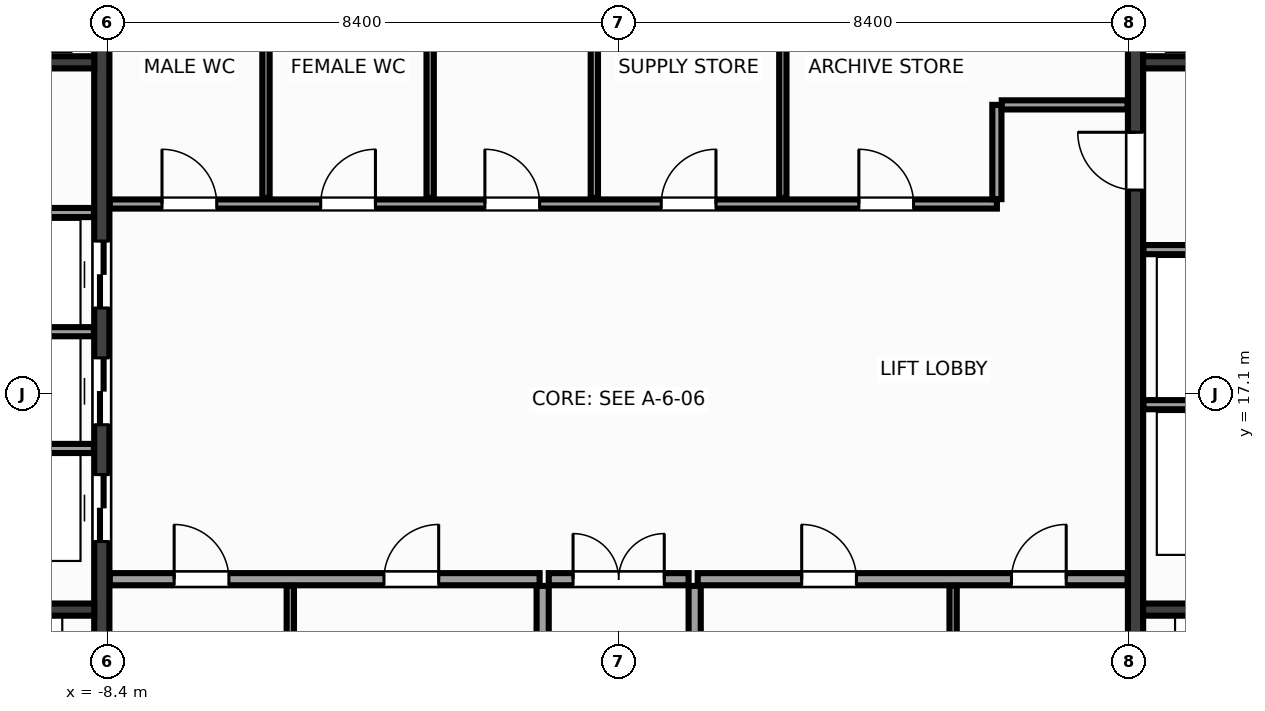
"""IFC4 building model, lengths in metres.
Left out: names, types, materials, properties, quantities, classifications, styles, units other than length and angle.
Written with IfcOpenShell. Run it as: python <this file> out.ifc"""

import sys

from ifc_helpers import new_model, si_unit, direction, frame, frame_2d, origin, place, context, subcontext, project, spatial, rectangle, extrude, source, transform, mapped, element, fill, save


model = new_model("IFC4")
c1 = context("Model", 3, precision=1e-05, world=origin(), true_north=direction((0.0, 1.0)))
c2 = subcontext(c1, "Body", "Model", "MODEL_VIEW")
j1 = project(units=[si_unit("LENGTHUNIT", "METRE"), si_unit("PLANEANGLEUNIT", "RADIAN")], contexts=[c1])
p1 = place(None, origin())
s1 = spatial("IfcSite", under=j1, at=p1, CompositionType="ELEMENT")
p2 = place(p1, origin())
s2 = spatial("IfcBuilding", under=s1, at=p2, CompositionType="ELEMENT")
p3 = place(p2, frame((0.0, 0.0, 254.0)))
s3 = spatial("IfcBuildingStorey", under=s2, at=p3, CompositionType="ELEMENT", Elevation=254.0)
m1 = source(origin(), c2, "Body", "SweptSolid", [
    extrude(rectangle(XDim=13.1, YDim=0.25, at=frame_2d((6.55, 0.0))), origin(), (0.0, 0.0, 1.0), 3.6),
])
p4 = place(p3, frame((-8.5, 10.45, 0.0), z_axis=(0.0, 0.0, 1.0), x_axis=(0.0, 1.0, 0.0)))
e1 = element("IfcWall", 1, at=p4, inside=s3, PredefinedType="SHEAR", context=c2, shape_type="MappedRepresentation", body=[
    mapped(m1, transform((0.0, 0.0, 0.0), x_axis=(1.0, 0.0, 0.0), y_axis=(0.0, 1.0, 0.0), z_axis=(0.0, 0.0, 1.0), scale=1.0)),
])
p5 = place(p4, frame((4.22, 0.0, 0.0)))
e2 = element("IfcOpeningElement", 2, at=p5, cuts=e1, PredefinedType="OPENING", context=c2, shape_type="SweptSolid", body=[
    extrude(rectangle(XDim=1.1, YDim=2.15, at=frame_2d((0.55, 1.075))), frame((0.0, 0.137, 0.0), z_axis=(0.0, -1.0, 0.0), x_axis=(1.0, 0.0, 0.0)), (0.0, 0.0, 1.0), 0.274),
])
p6 = place(p4, frame((6.14, 0.0, 0.0)))
e3 = element("IfcOpeningElement", 3, at=p6, cuts=e1, PredefinedType="OPENING", context=c2, shape_type="SweptSolid", body=[
    extrude(rectangle(XDim=1.1, YDim=2.15, at=frame_2d((0.55, 1.075))), frame((0.0, 0.137, 0.0), z_axis=(0.0, -1.0, 0.0), x_axis=(1.0, 0.0, 0.0)), (0.0, 0.0, 1.0), 0.274),
])
p7 = place(p4, frame((8.06, 0.0, 0.0)))
e4 = element("IfcOpeningElement", 4, at=p7, cuts=e1, PredefinedType="OPENING", context=c2, shape_type="SweptSolid", body=[
    extrude(rectangle(XDim=1.1, YDim=2.15, at=frame_2d((0.55, 1.075))), frame((0.0, 0.137, 0.0), z_axis=(0.0, -1.0, 0.0), x_axis=(1.0, 0.0, 0.0)), (0.0, 0.0, 1.0), 0.274),
])
p8 = place(p3, frame((8.5, 10.45, 0.0), z_axis=(0.0, 0.0, 1.0), x_axis=(0.0, 1.0, 0.0)))
e5 = element("IfcWall", 5, at=p8, inside=s3, PredefinedType="SHEAR", context=c2, shape_type="MappedRepresentation", body=[
    mapped(m1, transform((0.0, 0.0, 0.0), x_axis=(1.0, 0.0, 0.0), y_axis=(0.0, 1.0, 0.0), z_axis=(0.0, 0.0, 1.0), scale=1.0)),
])
p9 = place(p8, frame((10.0, 0.0, 0.0)))
e6 = element("IfcOpeningElement", 6, at=p9, cuts=e5, PredefinedType="OPENING", context=c2, shape_type="SweptSolid", body=[
    extrude(rectangle(XDim=0.95, YDim=2.15, at=frame_2d((0.475, 1.075))), frame((0.0, 0.137, 0.0), z_axis=(0.0, -1.0, 0.0), x_axis=(1.0, 0.0, 0.0)), (0.0, 0.0, 1.0), 0.274),
])
m2 = source(origin(), c2, "Body", "SweptSolid", [
    extrude(rectangle(XDim=2.825, YDim=0.2, at=frame_2d((1.413, 0.0))), origin(), (0.0, 0.0, 1.0), 3.6),
])
for number, where, z_axis, x_axis in (
    (7, (-11.45, 13.55, 0.0), (0.0, 0.0, 1.0), (1.0, 0.0, 0.0)),
    (8, (8.625, 13.55, 0.0), (0.0, 0.0, 1.0), (1.0, 0.0, 0.0)),
):
    element("IfcWall", number, at=place(p3, frame(where, z_axis=z_axis, x_axis=x_axis)), inside=s3, PredefinedType="SHEAR", context=c2, shape_type="MappedRepresentation", body=[
        mapped(m2, transform((0.0, 0.0, 0.0), x_axis=(1.0, 0.0, 0.0), y_axis=(0.0, 1.0, 0.0), z_axis=(0.0, 0.0, 1.0), scale=1.0)),
    ])
m3 = source(origin(), c2, "Body", "SweptSolid", [
    extrude(rectangle(XDim=3.02, YDim=0.2, at=frame_2d((1.51, 0.0))), origin(), (0.0, 0.0, 1.0), 3.6),
])
for number, where, z_axis, x_axis in (
    (9, (-11.645, 22.55, 0.0), (0.0, 0.0, 1.0), (1.0, 0.0, 0.0)),
    (10, (8.625, 22.55, 0.0), (0.0, 0.0, 1.0), (1.0, 0.0, 0.0)),
):
    element("IfcWall", number, at=place(p3, frame(where, z_axis=z_axis, x_axis=x_axis)), inside=s3, PredefinedType="SHEAR", context=c2, shape_type="MappedRepresentation", body=[
        mapped(m3, transform((0.0, 0.0, 0.0), x_axis=(1.0, 0.0, 0.0), y_axis=(0.0, 1.0, 0.0), z_axis=(0.0, 0.0, 1.0), scale=1.0)),
    ])
m4 = source(origin(), c2, "Body", "SweptSolid", [
    extrude(rectangle(XDim=3.01, YDim=0.15, at=frame_2d((1.505, 0.0))), origin(), (0.0, 0.0, 1.0), 3.37),
])
for number, where, z_axis, x_axis in (
    (11, (-11.64, 16.2, 0.0), (0.0, 0.0, 1.0), (1.0, 0.0, 0.0)),
    (12, (-11.64, 18.12, 0.0), (0.0, 0.0, 1.0), (1.0, 0.0, 0.0)),
    (13, (-11.64, 20.08, 0.0), (0.0, 0.0, 1.0), (1.0, 0.0, 0.0)),
    (14, (8.63, 16.92, 0.0), (0.0, 0.0, 1.0), (1.0, 0.0, 0.0)),
    (15, (8.63, 19.47, 0.0), (0.0, 0.0, 1.0), (1.0, 0.0, 0.0)),
):
    element("IfcWall", number, at=place(p3, frame(where, z_axis=z_axis, x_axis=x_axis)), inside=s3, PredefinedType="PARTITIONING", context=c2, shape_type="MappedRepresentation", body=[
        mapped(m4, transform((0.0, 0.0, 0.0), x_axis=(1.0, 0.0, 0.0), y_axis=(0.0, 1.0, 0.0), z_axis=(0.0, 0.0, 1.0), scale=1.0)),
    ])
m5 = source(origin(), c2, "Body", "SweptSolid", [
    extrude(rectangle(XDim=7.07, YDim=0.2, at=frame_2d((3.535, 0.0))), origin(), (0.0, 0.0, 1.0), 3.37),
])
p10 = place(p3, frame((-8.37, 14.05, 0.0), z_axis=(0.0, 0.0, 1.0), x_axis=(1.0, 0.0, 0.0)))
e16 = element("IfcWall", 16, at=p10, inside=s3, PredefinedType="PARTITIONING", context=c2, shape_type="MappedRepresentation", body=[
    mapped(m5, transform((0.0, 0.0, 0.0), x_axis=(1.0, 0.0, 0.0), y_axis=(0.0, 1.0, 0.0), z_axis=(0.0, 0.0, 1.0), scale=1.0)),
])
p11 = place(p10, frame((1.06, 0.0, 0.0)))
e17 = element("IfcOpeningElement", 17, at=p11, cuts=e16, PredefinedType="OPENING", context=c2, shape_type="SweptSolid", body=[
    extrude(rectangle(XDim=0.9, YDim=2.15, at=frame_2d((0.45, 1.075))), frame((0.0, 0.112, 0.0), z_axis=(0.0, -1.0, 0.0), x_axis=(1.0, 0.0, 0.0)), (0.0, 0.0, 1.0), 0.224),
])
p12 = place(p10, frame((4.51, 0.0, 0.0)))
e18 = element("IfcOpeningElement", 18, at=p12, cuts=e16, PredefinedType="OPENING", context=c2, shape_type="SweptSolid", body=[
    extrude(rectangle(XDim=0.9, YDim=2.15, at=frame_2d((0.45, 1.075))), frame((0.0, 0.112, 0.0), z_axis=(0.0, -1.0, 0.0), x_axis=(1.0, 0.0, 0.0)), (0.0, 0.0, 1.0), 0.224),
])
p13 = place(p3, frame((1.3, 14.05, 0.0), z_axis=(0.0, 0.0, 1.0), x_axis=(1.0, 0.0, 0.0)))
e19 = element("IfcWall", 19, at=p13, inside=s3, PredefinedType="PARTITIONING", context=c2, shape_type="MappedRepresentation", body=[
    mapped(m5, transform((0.0, 0.0, 0.0), x_axis=(1.0, 0.0, 0.0), y_axis=(0.0, 1.0, 0.0), z_axis=(0.0, 0.0, 1.0), scale=1.0)),
])
p14 = place(p13, frame((1.71, 0.0, 0.0)))
e20 = element("IfcOpeningElement", 20, at=p14, cuts=e19, PredefinedType="OPENING", context=c2, shape_type="SweptSolid", body=[
    extrude(rectangle(XDim=0.9, YDim=2.15, at=frame_2d((0.45, 1.075))), frame((0.0, 0.112, 0.0), z_axis=(0.0, -1.0, 0.0), x_axis=(1.0, 0.0, 0.0)), (0.0, 0.0, 1.0), 0.224),
])
p15 = place(p13, frame((5.16, 0.0, 0.0)))
e21 = element("IfcOpeningElement", 21, at=p15, cuts=e19, PredefinedType="OPENING", context=c2, shape_type="SweptSolid", body=[
    extrude(rectangle(XDim=0.9, YDim=2.15, at=frame_2d((0.45, 1.075))), frame((0.0, 0.112, 0.0), z_axis=(0.0, -1.0, 0.0), x_axis=(1.0, 0.0, 0.0)), (0.0, 0.0, 1.0), 0.224),
])
m6 = source(origin(), c2, "Body", "SweptSolid", [
    extrude(rectangle(XDim=3.49, YDim=0.2, at=frame_2d((1.745, 0.0))), origin(), (0.0, 0.0, 1.0), 3.37),
])
for number, where, z_axis, x_axis in (
    (22, (-1.25, 10.45, 0.0), (0.0, 0.0, 1.0), (0.0, 1.0, 0.0)),
    (23, (1.25, 10.45, 0.0), (0.0, 0.0, 1.0), (0.0, 1.0, 0.0)),
):
    element("IfcWall", number, at=place(p3, frame(where, z_axis=z_axis, x_axis=x_axis)), inside=s3, PredefinedType="PARTITIONING", context=c2, shape_type="MappedRepresentation", body=[
        mapped(m6, transform((0.0, 0.0, 0.0), x_axis=(1.0, 0.0, 0.0), y_axis=(0.0, 1.0, 0.0), z_axis=(0.0, 0.0, 1.0), scale=1.0)),
    ])
m7 = source(origin(), c2, "Body", "SweptSolid", [
    extrude(rectangle(XDim=2.3, YDim=0.2, at=frame_2d((1.15, 0.0))), origin(), (0.0, 0.0, 1.0), 3.37),
])
p16 = place(p3, frame((-1.15, 14.05, 0.0), z_axis=(0.0, 0.0, 1.0), x_axis=(1.0, 0.0, 0.0)))
e24 = element("IfcWall", 24, at=p16, inside=s3, PredefinedType="PARTITIONING", context=c2, shape_type="MappedRepresentation", body=[
    mapped(m7, transform((0.0, 0.0, 0.0), x_axis=(1.0, 0.0, 0.0), y_axis=(0.0, 1.0, 0.0), z_axis=(0.0, 0.0, 1.0), scale=1.0)),
])
p17 = place(p16, frame((0.4, 0.0, 0.0)))
e25 = element("IfcOpeningElement", 25, at=p17, cuts=e24, PredefinedType="OPENING", context=c2, shape_type="SweptSolid", body=[
    extrude(rectangle(XDim=1.5, YDim=2.2, at=frame_2d((0.75, 1.1))), frame((0.0, 0.112, 0.0), z_axis=(0.0, -1.0, 0.0), x_axis=(1.0, 0.0, 0.0)), (0.0, 0.0, 1.0), 0.224),
])
m8 = source(origin(), c2, "Body", "SweptSolid", [
    extrude(rectangle(XDim=14.59, YDim=0.15, at=frame_2d((7.295, 0.0))), origin(), (0.0, 0.0, 1.0), 3.37),
])
p18 = place(p3, frame((-8.37, 20.22, 0.0), z_axis=(0.0, 0.0, 1.0), x_axis=(1.0, 0.0, 0.0)))
e26 = element("IfcWall", 26, at=p18, inside=s3, PredefinedType="PARTITIONING", context=c2, shape_type="MappedRepresentation", body=[
    mapped(m8, transform((0.0, 0.0, 0.0), x_axis=(1.0, 0.0, 0.0), y_axis=(0.0, 1.0, 0.0), z_axis=(0.0, 0.0, 1.0), scale=1.0)),
])
p19 = place(p18, frame((0.86, 0.0, 0.0)))
e27 = element("IfcOpeningElement", 27, at=p19, cuts=e26, PredefinedType="OPENING", context=c2, shape_type="SweptSolid", body=[
    extrude(rectangle(XDim=0.9, YDim=2.15, at=frame_2d((0.45, 1.075))), frame((0.0, 0.087, 0.0), z_axis=(0.0, -1.0, 0.0), x_axis=(1.0, 0.0, 0.0)), (0.0, 0.0, 1.0), 0.174),
])
p20 = place(p18, frame((3.47, 0.0, 0.0)))
e28 = element("IfcOpeningElement", 28, at=p20, cuts=e26, PredefinedType="OPENING", context=c2, shape_type="SweptSolid", body=[
    extrude(rectangle(XDim=0.9, YDim=2.15, at=frame_2d((0.45, 1.075))), frame((0.0, 0.087, 0.0), z_axis=(0.0, -1.0, 0.0), x_axis=(1.0, 0.0, 0.0)), (0.0, 0.0, 1.0), 0.174),
])
p21 = place(p18, frame((6.17, 0.0, 0.0)))
e29 = element("IfcOpeningElement", 29, at=p21, cuts=e26, PredefinedType="OPENING", context=c2, shape_type="SweptSolid", body=[
    extrude(rectangle(XDim=0.9, YDim=2.15, at=frame_2d((0.45, 1.075))), frame((0.0, 0.087, 0.0), z_axis=(0.0, -1.0, 0.0), x_axis=(1.0, 0.0, 0.0)), (0.0, 0.0, 1.0), 0.174),
])
p22 = place(p18, frame((9.07, 0.0, 0.0)))
e30 = element("IfcOpeningElement", 30, at=p22, cuts=e26, PredefinedType="OPENING", context=c2, shape_type="SweptSolid", body=[
    extrude(rectangle(XDim=0.9, YDim=2.15, at=frame_2d((0.45, 1.075))), frame((0.0, 0.087, 0.0), z_axis=(0.0, -1.0, 0.0), x_axis=(1.0, 0.0, 0.0)), (0.0, 0.0, 1.0), 0.174),
])
p23 = place(p18, frame((12.32, 0.0, 0.0)))
e31 = element("IfcOpeningElement", 31, at=p23, cuts=e26, PredefinedType="OPENING", context=c2, shape_type="SweptSolid", body=[
    extrude(rectangle(XDim=0.9, YDim=2.15, at=frame_2d((0.45, 1.075))), frame((0.0, 0.087, 0.0), z_axis=(0.0, -1.0, 0.0), x_axis=(1.0, 0.0, 0.0)), (0.0, 0.0, 1.0), 0.174),
])
m9 = source(origin(), c2, "Body", "SweptSolid", [
    extrude(rectangle(XDim=1.55, YDim=0.15, at=frame_2d((0.775, 0.0))), origin(), (0.0, 0.0, 1.0), 3.37),
])
p24 = place(p3, frame((6.22, 20.3, 0.0), z_axis=(0.0, 0.0, 1.0), x_axis=(0.0, 1.0, 0.0)))
e32 = element("IfcWall", 32, at=p24, inside=s3, PredefinedType="PARTITIONING", context=c2, shape_type="MappedRepresentation", body=[
    mapped(m9, transform((0.0, 0.0, 0.0), x_axis=(1.0, 0.0, 0.0), y_axis=(0.0, 1.0, 0.0), z_axis=(0.0, 0.0, 1.0), scale=1.0)),
])
m10 = source(origin(), c2, "Body", "SweptSolid", [
    extrude(rectangle(XDim=2.07, YDim=0.15, at=frame_2d((1.035, 0.0))), origin(), (0.0, 0.0, 1.0), 3.37),
])
p25 = place(p3, frame((6.3, 21.85, 0.0), z_axis=(0.0, 0.0, 1.0), x_axis=(1.0, 0.0, 0.0)))
e33 = element("IfcWall", 33, at=p25, inside=s3, PredefinedType="PARTITIONING", context=c2, shape_type="MappedRepresentation", body=[
    mapped(m10, transform((0.0, 0.0, 0.0), x_axis=(1.0, 0.0, 0.0), y_axis=(0.0, 1.0, 0.0), z_axis=(0.0, 0.0, 1.0), scale=1.0)),
])
m11 = source(origin(), c2, "Body", "SweptSolid", [
    extrude(rectangle(XDim=3.49, YDim=0.12, at=frame_2d((1.745, 0.0))), origin(), (0.0, 0.0, 1.0), 3.37),
])
for number, where, z_axis, x_axis in (
    (34, (-5.4, 10.45, 0.0), (0.0, 0.0, 1.0), (0.0, 1.0, 0.0)),
    (35, (5.5, 10.45, 0.0), (0.0, 0.0, 1.0), (0.0, 1.0, 0.0)),
):
    element("IfcWall", number, at=place(p3, frame(where, z_axis=z_axis, x_axis=x_axis)), inside=s3, PredefinedType="PARTITIONING", context=c2, shape_type="MappedRepresentation", body=[
        mapped(m11, transform((0.0, 0.0, 0.0), x_axis=(1.0, 0.0, 0.0), y_axis=(0.0, 1.0, 0.0), z_axis=(0.0, 0.0, 1.0), scale=1.0)),
    ])
m12 = source(origin(), c2, "Body", "SweptSolid", [
    extrude(rectangle(XDim=3.19, YDim=0.12, at=frame_2d((1.595, 0.0))), origin(), (0.0, 0.0, 1.0), 3.37),
])
for number, where, z_axis, x_axis in (
    (36, (-5.8, 20.32, 0.0), (0.0, 0.0, 1.0), (0.0, 1.0, 0.0)),
    (37, (-3.1, 20.32, 0.0), (0.0, 0.0, 1.0), (0.0, 1.0, 0.0)),
    (38, (-0.4, 20.32, 0.0), (0.0, 0.0, 1.0), (0.0, 1.0, 0.0)),
    (39, (2.7, 20.32, 0.0), (0.0, 0.0, 1.0), (0.0, 1.0, 0.0)),
):
    element("IfcWall", number, at=place(p3, frame(where, z_axis=z_axis, x_axis=x_axis)), inside=s3, PredefinedType="PARTITIONING", context=c2, shape_type="MappedRepresentation", body=[
        mapped(m12, transform((0.0, 0.0, 0.0), x_axis=(1.0, 0.0, 0.0), y_axis=(0.0, 1.0, 0.0), z_axis=(0.0, 0.0, 1.0), scale=1.0)),
    ])
m13 = source(origin(), c2, "Body", "SweptSolid", [
    extrude(rectangle(XDim=1.1, YDim=2.15, at=frame_2d((0.55, 1.075))), frame((0.0, 0.025, 0.0), z_axis=(0.0, -1.0, 0.0), x_axis=(1.0, 0.0, 0.0)), (0.0, 0.0, 1.0), 0.05),
])
p26 = place(p5, origin())
e40 = element("IfcDoor", 40, at=p26, inside=s3, OperationType="DOUBLE_DOOR_SLIDING", PredefinedType="DOOR", context=c2, shape_type="MappedRepresentation", body=[
    mapped(m13, transform((0.0, 0.0, 0.0), x_axis=(1.0, 0.0, 0.0), y_axis=(0.0, 1.0, 0.0), z_axis=(0.0, 0.0, 1.0), scale=1.0)),
])
fill(e2, e40)
p27 = place(p6, origin())
e41 = element("IfcDoor", 41, at=p27, inside=s3, OperationType="DOUBLE_DOOR_SLIDING", PredefinedType="DOOR", context=c2, shape_type="MappedRepresentation", body=[
    mapped(m13, transform((0.0, 0.0, 0.0), x_axis=(1.0, 0.0, 0.0), y_axis=(0.0, 1.0, 0.0), z_axis=(0.0, 0.0, 1.0), scale=1.0)),
])
fill(e3, e41)
p28 = place(p7, origin())
e42 = element("IfcDoor", 42, at=p28, inside=s3, OperationType="DOUBLE_DOOR_SLIDING", PredefinedType="DOOR", context=c2, shape_type="MappedRepresentation", body=[
    mapped(m13, transform((0.0, 0.0, 0.0), x_axis=(1.0, 0.0, 0.0), y_axis=(0.0, 1.0, 0.0), z_axis=(0.0, 0.0, 1.0), scale=1.0)),
])
fill(e4, e42)
m14 = source(origin(), c2, "Body", "SweptSolid", [
    extrude(rectangle(XDim=0.95, YDim=2.15, at=frame_2d((0.475, 1.075))), frame((0.0, 0.025, 0.0), z_axis=(0.0, -1.0, 0.0), x_axis=(1.0, 0.0, 0.0)), (0.0, 0.0, 1.0), 0.05),
])
p29 = place(p9, origin())
e43 = element("IfcDoor", 43, at=p29, inside=s3, OperationType="SINGLE_SWING_RIGHT", PredefinedType="DOOR", context=c2, shape_type="MappedRepresentation", body=[
    mapped(m14, transform((0.0, 0.0, 0.0), x_axis=(1.0, 0.0, 0.0), y_axis=(0.0, 1.0, 0.0), z_axis=(0.0, 0.0, 1.0), scale=1.0)),
])
fill(e6, e43)
m15 = source(origin(), c2, "Body", "SweptSolid", [
    extrude(rectangle(XDim=0.9, YDim=2.15, at=frame_2d((0.45, 1.075))), frame((0.0, 0.025, 0.0), z_axis=(0.0, -1.0, 0.0), x_axis=(1.0, 0.0, 0.0)), (0.0, 0.0, 1.0), 0.05),
])
p30 = place(p11, origin())
e44 = element("IfcDoor", 44, at=p30, inside=s3, OperationType="SINGLE_SWING_LEFT", PredefinedType="DOOR", context=c2, shape_type="MappedRepresentation", body=[
    mapped(m15, transform((0.0, 0.0, 0.0), x_axis=(1.0, 0.0, 0.0), y_axis=(0.0, 1.0, 0.0), z_axis=(0.0, 0.0, 1.0), scale=1.0)),
])
fill(e17, e44)
p31 = place(p12, origin())
e45 = element("IfcDoor", 45, at=p31, inside=s3, OperationType="SINGLE_SWING_RIGHT", PredefinedType="DOOR", context=c2, shape_type="MappedRepresentation", body=[
    mapped(m15, transform((0.0, 0.0, 0.0), x_axis=(1.0, 0.0, 0.0), y_axis=(0.0, 1.0, 0.0), z_axis=(0.0, 0.0, 1.0), scale=1.0)),
])
fill(e18, e45)
p32 = place(p14, origin())
e46 = element("IfcDoor", 46, at=p32, inside=s3, OperationType="SINGLE_SWING_LEFT", PredefinedType="DOOR", context=c2, shape_type="MappedRepresentation", body=[
    mapped(m15, transform((0.0, 0.0, 0.0), x_axis=(1.0, 0.0, 0.0), y_axis=(0.0, 1.0, 0.0), z_axis=(0.0, 0.0, 1.0), scale=1.0)),
])
fill(e20, e46)
p33 = place(p15, origin())
e47 = element("IfcDoor", 47, at=p33, inside=s3, OperationType="SINGLE_SWING_RIGHT", PredefinedType="DOOR", context=c2, shape_type="MappedRepresentation", body=[
    mapped(m15, transform((0.0, 0.0, 0.0), x_axis=(1.0, 0.0, 0.0), y_axis=(0.0, 1.0, 0.0), z_axis=(0.0, 0.0, 1.0), scale=1.0)),
])
fill(e21, e47)
m16 = source(origin(), c2, "Body", "SweptSolid", [
    extrude(rectangle(XDim=1.5, YDim=2.2, at=frame_2d((0.75, 1.1))), frame((0.0, 0.025, 0.0), z_axis=(0.0, -1.0, 0.0), x_axis=(1.0, 0.0, 0.0)), (0.0, 0.0, 1.0), 0.05),
])
p34 = place(p17, origin())
e48 = element("IfcDoor", 48, at=p34, inside=s3, OperationType="DOUBLE_DOOR_SINGLE_SWING", PredefinedType="DOOR", context=c2, shape_type="MappedRepresentation", body=[
    mapped(m16, transform((0.0, 0.0, 0.0), x_axis=(1.0, 0.0, 0.0), y_axis=(0.0, 1.0, 0.0), z_axis=(0.0, 0.0, 1.0), scale=1.0)),
])
fill(e25, e48)
p35 = place(p19, origin())
e49 = element("IfcDoor", 49, at=p35, inside=s3, OperationType="SINGLE_SWING_LEFT", PredefinedType="DOOR", context=c2, shape_type="MappedRepresentation", body=[
    mapped(m15, transform((0.0, 0.0, 0.0), x_axis=(1.0, 0.0, 0.0), y_axis=(0.0, 1.0, 0.0), z_axis=(0.0, 0.0, 1.0), scale=1.0)),
])
fill(e27, e49)
p36 = place(p20, origin())
e50 = element("IfcDoor", 50, at=p36, inside=s3, OperationType="SINGLE_SWING_RIGHT", PredefinedType="DOOR", context=c2, shape_type="MappedRepresentation", body=[
    mapped(m15, transform((0.0, 0.0, 0.0), x_axis=(1.0, 0.0, 0.0), y_axis=(0.0, 1.0, 0.0), z_axis=(0.0, 0.0, 1.0), scale=1.0)),
])
fill(e28, e50)
p37 = place(p21, origin())
e51 = element("IfcDoor", 51, at=p37, inside=s3, OperationType="SINGLE_SWING_LEFT", PredefinedType="DOOR", context=c2, shape_type="MappedRepresentation", body=[
    mapped(m15, transform((0.0, 0.0, 0.0), x_axis=(1.0, 0.0, 0.0), y_axis=(0.0, 1.0, 0.0), z_axis=(0.0, 0.0, 1.0), scale=1.0)),
])
fill(e29, e51)
p38 = place(p22, origin())
e52 = element("IfcDoor", 52, at=p38, inside=s3, OperationType="SINGLE_SWING_RIGHT", PredefinedType="DOOR", context=c2, shape_type="MappedRepresentation", body=[
    mapped(m15, transform((0.0, 0.0, 0.0), x_axis=(1.0, 0.0, 0.0), y_axis=(0.0, 1.0, 0.0), z_axis=(0.0, 0.0, 1.0), scale=1.0)),
])
fill(e30, e52)
p39 = place(p23, origin())
e53 = element("IfcDoor", 53, at=p39, inside=s3, OperationType="SINGLE_SWING_LEFT", PredefinedType="DOOR", context=c2, shape_type="MappedRepresentation", body=[
    mapped(m15, transform((0.0, 0.0, 0.0), x_axis=(1.0, 0.0, 0.0), y_axis=(0.0, 1.0, 0.0), z_axis=(0.0, 0.0, 1.0), scale=1.0)),
])
fill(e31, e53)
save(model, sys.argv[1])
